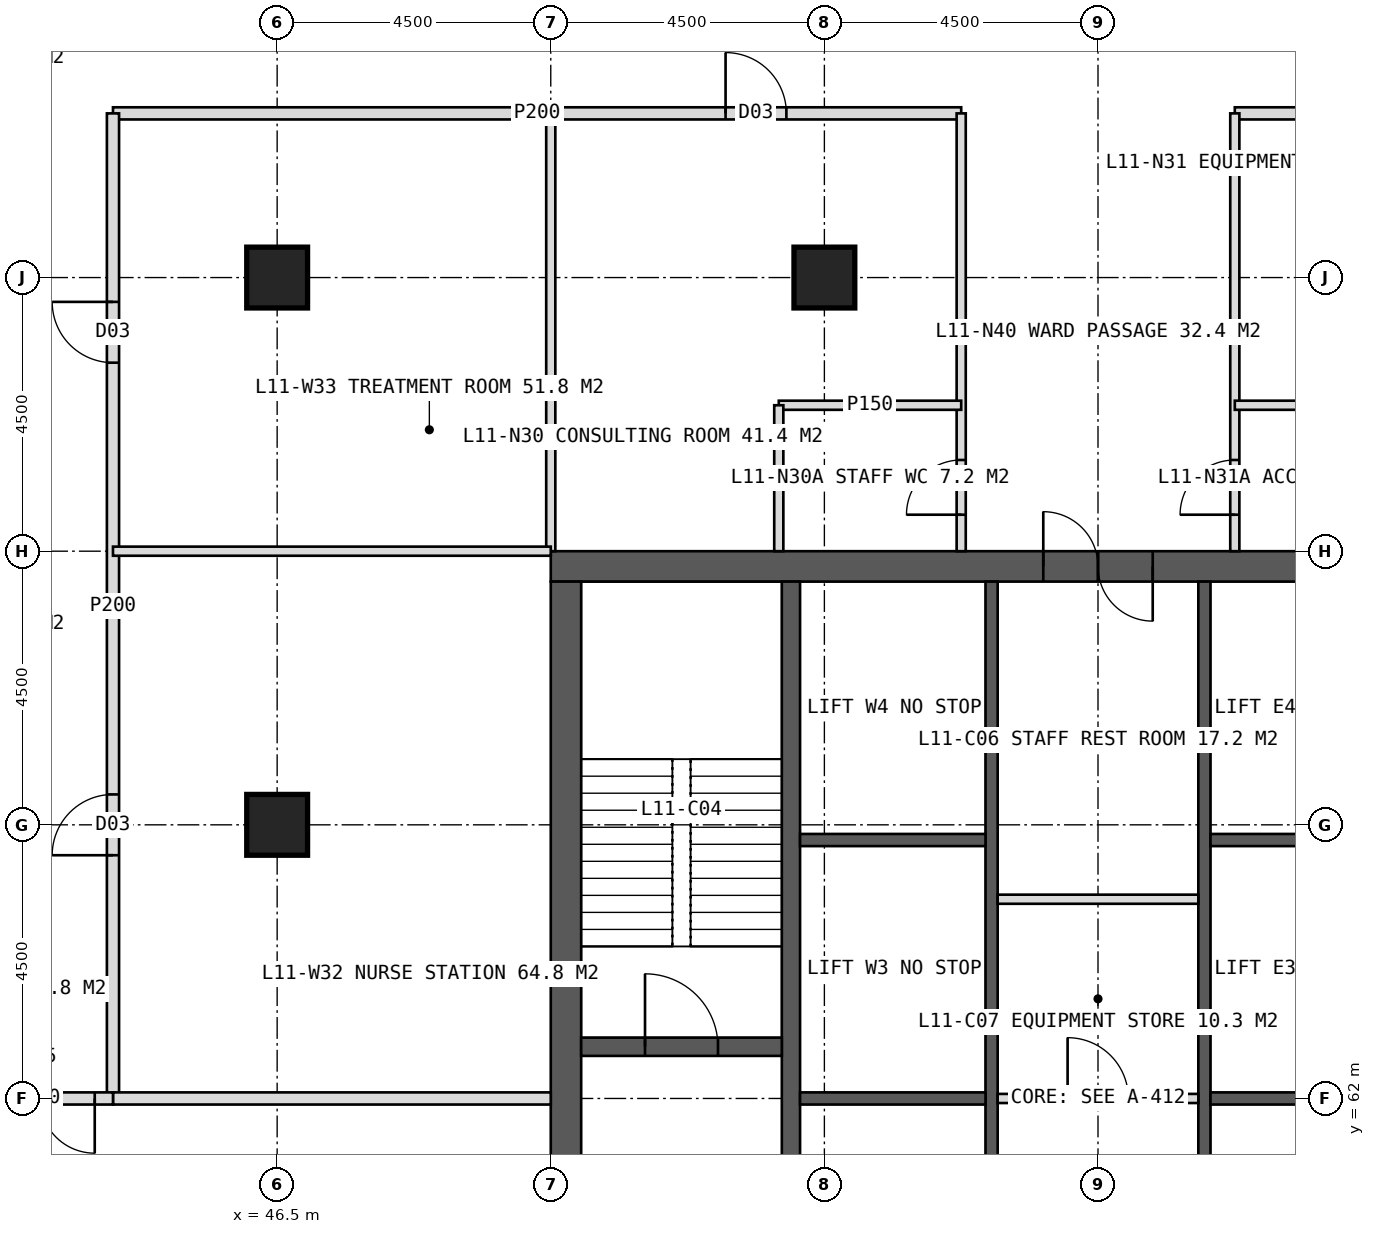
"""IFC4 building model, lengths in metres.
Left out: names, types, materials, properties, quantities, classifications, styles, units other than length and angle.
Written with IfcOpenShell. Run it as: python <this file> out.ifc"""

import sys

from ifc_helpers import new_model, si_unit, direction, frame, frame_2d, origin, origin_2d, place, context, subcontext, project, spatial, rectangle, hollow_rectangle, extrude, element, fill, save


model = new_model("IFC4")
c1 = context("Model", 3, precision=1e-05, world=origin(), true_north=direction((0.0, 1.0)))
c2 = subcontext(c1, "Body", "Model", "MODEL_VIEW")
j1 = project(units=[si_unit("LENGTHUNIT", "METRE"), si_unit("PLANEANGLEUNIT", "RADIAN")], contexts=[c1])
p1 = place(None, origin())
s1 = spatial("IfcSite", under=j1, at=p1, CompositionType="ELEMENT")
p2 = place(p1, origin())
s2 = spatial("IfcBuilding", under=s1, at=p2, CompositionType="ELEMENT")
p3 = place(p2, frame((0.0, 0.0, 51.0)))
s3 = spatial("IfcBuildingStorey", under=s2, at=p3, CompositionType="ELEMENT", Elevation=51.0)
p4 = place(p3, frame((51.0, 70.75, 0.0), z_axis=(0.0, 0.0, 1.0), x_axis=(1.0, 0.0, 0.0)))
e1 = element("IfcWall", 1, at=p4, inside=s3, PredefinedType="SHEAR", context=c2, shape_type="SweptSolid", body=[
    extrude(rectangle(XDim=18.0, YDim=0.5, at=frame_2d((9.0, 0.0))), origin(), (0.0, 0.0, 1.0), 4.0),
])
p5 = place(p4, frame((8.1, 0.0, 0.0)))
e2 = element("IfcOpeningElement", 2, at=p5, cuts=e1, PredefinedType="OPENING", context=c2, shape_type="SweptSolid", body=[
    extrude(rectangle(XDim=1.8, YDim=2.2, at=frame_2d((0.9, 1.1))), frame((0.0, 0.26, 0.0), z_axis=(0.0, -1.0, 0.0), x_axis=(1.0, 0.0, 0.0)), (0.0, 0.0, 1.0), 0.52),
])
p6 = place(p3, frame((51.25, 53.5, 0.0), z_axis=(0.0, 0.0, 1.0), x_axis=(0.0, 1.0, 0.0)))
e3 = element("IfcWall", 3, at=p6, inside=s3, PredefinedType="SHEAR", context=c2, shape_type="SweptSolid", body=[
    extrude(rectangle(XDim=17.0, YDim=0.5, at=frame_2d((8.5, 0.0))), origin(), (0.0, 0.0, 1.0), 4.0),
])
p7 = place(p6, frame((6.0, 0.0, 0.0)))
e4 = element("IfcOpeningElement", 4, at=p7, cuts=e3, PredefinedType="OPENING", context=c2, shape_type="SweptSolid", body=[
    extrude(rectangle(XDim=1.5, YDim=2.2, at=frame_2d((0.75, 1.1))), frame((0.0, 0.26, 0.0), z_axis=(0.0, -1.0, 0.0), x_axis=(1.0, 0.0, 0.0)), (0.0, 0.0, 1.0), 0.52),
])
p8 = place(p3, frame((54.95, 53.5, 0.0), z_axis=(0.0, 0.0, 1.0), x_axis=(0.0, 1.0, 0.0)))
e5 = element("IfcWall", 5, at=p8, inside=s3, PredefinedType="SHEAR", context=c2, shape_type="SweptSolid", body=[
    extrude(rectangle(XDim=17.0, YDim=0.3, at=frame_2d((8.5, 0.0))), origin(), (0.0, 0.0, 1.0), 4.0),
])
p9 = place(p3, frame((58.25, 53.5, 0.0), z_axis=(0.0, 0.0, 1.0), x_axis=(0.0, 1.0, 0.0)))
e6 = element("IfcWall", 6, at=p9, inside=s3, PredefinedType="SHEAR", context=c2, shape_type="SweptSolid", body=[
    extrude(rectangle(XDim=17.0, YDim=0.2, at=frame_2d((8.5, 0.0))), origin(), (0.0, 0.0, 1.0), 4.0),
])
p10 = place(p9, frame((1.375, 0.0, 0.0)))
e7 = element("IfcOpeningElement", 7, at=p10, cuts=e6, PredefinedType="OPENING", context=c2, shape_type="SweptSolid", body=[
    extrude(rectangle(XDim=1.4, YDim=2.2, at=frame_2d((0.7, 1.1))), frame((0.0, 0.11, 0.0), z_axis=(0.0, -1.0, 0.0), x_axis=(1.0, 0.0, 0.0)), (0.0, 0.0, 1.0), 0.22),
])
p11 = place(p9, frame((5.675, 0.0, 0.0)))
e8 = element("IfcOpeningElement", 8, at=p11, cuts=e6, PredefinedType="OPENING", context=c2, shape_type="SweptSolid", body=[
    extrude(rectangle(XDim=1.4, YDim=2.2, at=frame_2d((0.7, 1.1))), frame((0.0, 0.11, 0.0), z_axis=(0.0, -1.0, 0.0), x_axis=(1.0, 0.0, 0.0)), (0.0, 0.0, 1.0), 0.22),
])
p12 = place(p3, frame((61.75, 53.5, 0.0), z_axis=(0.0, 0.0, 1.0), x_axis=(0.0, 1.0, 0.0)))
e9 = element("IfcWall", 9, at=p12, inside=s3, PredefinedType="SHEAR", context=c2, shape_type="SweptSolid", body=[
    extrude(rectangle(XDim=17.0, YDim=0.2, at=frame_2d((8.5, 0.0))), origin(), (0.0, 0.0, 1.0), 4.0),
])
p13 = place(p12, frame((1.375, 0.0, 0.0)))
e10 = element("IfcOpeningElement", 10, at=p13, cuts=e9, PredefinedType="OPENING", context=c2, shape_type="SweptSolid", body=[
    extrude(rectangle(XDim=1.4, YDim=2.2, at=frame_2d((0.7, 1.1))), frame((0.0, 0.11, 0.0), z_axis=(0.0, -1.0, 0.0), x_axis=(1.0, 0.0, 0.0)), (0.0, 0.0, 1.0), 0.22),
])
p14 = place(p12, frame((5.675, 0.0, 0.0)))
e11 = element("IfcOpeningElement", 11, at=p14, cuts=e9, PredefinedType="OPENING", context=c2, shape_type="SweptSolid", body=[
    extrude(rectangle(XDim=1.4, YDim=2.2, at=frame_2d((0.7, 1.1))), frame((0.0, 0.11, 0.0), z_axis=(0.0, -1.0, 0.0), x_axis=(1.0, 0.0, 0.0)), (0.0, 0.0, 1.0), 0.22),
])
for number, where, z_axis, x_axis in (
    (12, (55.1, 62.0, 0.0), (0.0, 0.0, 1.0), (1.0, 0.0, 0.0)),
    (13, (61.85, 62.0, 0.0), (0.0, 0.0, 1.0), (1.0, 0.0, 0.0)),
    (14, (55.1, 66.25, 0.0), (0.0, 0.0, 1.0), (1.0, 0.0, 0.0)),
    (15, (61.85, 66.25, 0.0), (0.0, 0.0, 1.0), (1.0, 0.0, 0.0)),
):
    element("IfcWall", number, at=place(p3, frame(where, z_axis=z_axis, x_axis=x_axis)), inside=s3, PredefinedType="SHEAR", context=c2, shape_type="SweptSolid", body=[
        extrude(rectangle(XDim=3.05, YDim=0.2, at=frame_2d((1.525, 0.0))), origin(), (0.0, 0.0, 1.0), 4.0),
    ])
p15 = place(p3, frame((51.5, 62.85, 0.0), z_axis=(0.0, 0.0, 1.0), x_axis=(1.0, 0.0, 0.0)))
e16 = element("IfcWall", 16, at=p15, inside=s3, PredefinedType="SHEAR", context=c2, shape_type="SweptSolid", body=[
    extrude(rectangle(XDim=3.3, YDim=0.3, at=frame_2d((1.65, 0.0))), origin(), (0.0, 0.0, 1.0), 4.0),
])
p16 = place(p15, frame((1.05, 0.0, 0.0)))
e17 = element("IfcOpeningElement", 17, at=p16, cuts=e16, PredefinedType="OPENING", context=c2, shape_type="SweptSolid", body=[
    extrude(rectangle(XDim=1.2, YDim=2.1, at=frame_2d((0.6, 1.05))), frame((0.0, 0.16, 0.0), z_axis=(0.0, -1.0, 0.0), x_axis=(1.0, 0.0, 0.0)), (0.0, 0.0, 1.0), 0.32),
])
for number, where, z_axis, x_axis in (
    (18, (46.5, 75.5, 0.0), (0.0, 0.0, 1.0), (1.0, 0.0, 0.0)),
    (19, (55.5, 75.5, 0.0), (0.0, 0.0, 1.0), (1.0, 0.0, 0.0)),
    (20, (46.5, 66.5, 0.0), (0.0, 0.0, 1.0), (1.0, 0.0, 0.0)),
):
    element("IfcColumn", number, at=place(p3, frame(where, z_axis=z_axis, x_axis=x_axis)), inside=s3, PredefinedType="COLUMN", context=c2, shape_type="SweptSolid", body=[
        extrude(hollow_rectangle(XDim=1.0, YDim=1.0, WallThickness=0.1, at=origin_2d()), origin(), (0.0, 0.0, 1.0), 4.0),
    ])
p17 = place(p3, frame((51.0, 71.0, 0.0), z_axis=(0.0, 0.0, 1.0), x_axis=(0.0, 1.0, 0.0)))
e21 = element("IfcWall", 21, at=p17, inside=s3, PredefinedType="PARTITIONING", context=c2, shape_type="SweptSolid", body=[
    extrude(rectangle(XDim=7.2, YDim=0.15, at=frame_2d((3.6, 0.0))), origin(), (0.0, 0.0, 1.0), 3.75),
])
p18 = place(p3, frame((43.8, 78.2, 0.0), z_axis=(0.0, 0.0, 1.0), x_axis=(1.0, 0.0, 0.0)))
e22 = element("IfcWall", 22, at=p18, inside=s3, PredefinedType="PARTITIONING", context=c2, shape_type="SweptSolid", body=[
    extrude(rectangle(XDim=13.95, YDim=0.2, at=frame_2d((6.975, 0.0))), origin(), (0.0, 0.0, 1.0), 3.75),
])
p19 = place(p18, frame((10.075, 0.0, 0.0)))
e23 = element("IfcOpeningElement", 23, at=p19, cuts=e22, PredefinedType="OPENING", context=c2, shape_type="SweptSolid", body=[
    extrude(rectangle(XDim=1.0, YDim=2.1, at=frame_2d((0.5, 1.05))), frame((0.0, 0.11, 0.0), z_axis=(0.0, -1.0, 0.0), x_axis=(1.0, 0.0, 0.0)), (0.0, 0.0, 1.0), 0.22),
])
p20 = place(p3, frame((62.25, 78.2, 0.0), z_axis=(0.0, 0.0, 1.0), x_axis=(1.0, 0.0, 0.0)))
e24 = element("IfcWall", 24, at=p20, inside=s3, PredefinedType="PARTITIONING", context=c2, shape_type="SweptSolid", body=[
    extrude(rectangle(XDim=6.75, YDim=0.2, at=frame_2d((3.375, 0.0))), origin(), (0.0, 0.0, 1.0), 3.75),
])
p21 = place(p20, frame((1.375, 0.0, 0.0)))
e25 = element("IfcOpeningElement", 25, at=p21, cuts=e24, PredefinedType="OPENING", context=c2, shape_type="SweptSolid", body=[
    extrude(rectangle(XDim=1.0, YDim=2.1, at=frame_2d((0.5, 1.05))), frame((0.0, 0.11, 0.0), z_axis=(0.0, -1.0, 0.0), x_axis=(1.0, 0.0, 0.0)), (0.0, 0.0, 1.0), 0.22),
])
p22 = place(p20, frame((5.5, 0.0, 0.0)))
e26 = element("IfcOpeningElement", 26, at=p22, cuts=e24, PredefinedType="OPENING", context=c2, shape_type="SweptSolid", body=[
    extrude(rectangle(XDim=1.0, YDim=2.1, at=frame_2d((0.5, 1.05))), frame((0.0, 0.11, 0.0), z_axis=(0.0, -1.0, 0.0), x_axis=(1.0, 0.0, 0.0)), (0.0, 0.0, 1.0), 0.22),
])
p23 = place(p3, frame((57.75, 71.0, 0.0), z_axis=(0.0, 0.0, 1.0), x_axis=(0.0, 1.0, 0.0)))
e27 = element("IfcWall", 27, at=p23, inside=s3, PredefinedType="PARTITIONING", context=c2, shape_type="SweptSolid", body=[
    extrude(rectangle(XDim=7.2, YDim=0.15, at=frame_2d((3.6, 0.0))), origin(), (0.0, 0.0, 1.0), 3.75),
])
p24 = place(p23, frame((0.6, 0.0, 0.0)))
e28 = element("IfcOpeningElement", 28, at=p24, cuts=e27, PredefinedType="OPENING", context=c2, shape_type="SweptSolid", body=[
    extrude(rectangle(XDim=0.9, YDim=2.1, at=frame_2d((0.45, 1.05))), frame((0.0, 0.085, 0.0), z_axis=(0.0, -1.0, 0.0), x_axis=(1.0, 0.0, 0.0)), (0.0, 0.0, 1.0), 0.17),
])
p25 = place(p3, frame((62.25, 71.0, 0.0), z_axis=(0.0, 0.0, 1.0), x_axis=(0.0, 1.0, 0.0)))
e29 = element("IfcWall", 29, at=p25, inside=s3, PredefinedType="PARTITIONING", context=c2, shape_type="SweptSolid", body=[
    extrude(rectangle(XDim=7.2, YDim=0.15, at=frame_2d((3.6, 0.0))), origin(), (0.0, 0.0, 1.0), 3.75),
])
p26 = place(p25, frame((0.6, 0.0, 0.0)))
e30 = element("IfcOpeningElement", 30, at=p26, cuts=e29, PredefinedType="OPENING", context=c2, shape_type="SweptSolid", body=[
    extrude(rectangle(XDim=0.9, YDim=2.1, at=frame_2d((0.45, 1.05))), frame((0.0, 0.085, 0.0), z_axis=(0.0, -1.0, 0.0), x_axis=(1.0, 0.0, 0.0)), (0.0, 0.0, 1.0), 0.17),
])
p27 = place(p3, frame((54.75, 73.4, 0.0), z_axis=(0.0, 0.0, 1.0), x_axis=(1.0, 0.0, 0.0)))
e31 = element("IfcWall", 31, at=p27, inside=s3, PredefinedType="PARTITIONING", context=c2, shape_type="SweptSolid", body=[
    extrude(rectangle(XDim=3.0, YDim=0.15, at=frame_2d((1.5, 0.0))), origin(), (0.0, 0.0, 1.0), 3.75),
])
p28 = place(p3, frame((54.75, 71.0, 0.0), z_axis=(0.0, 0.0, 1.0), x_axis=(0.0, 1.0, 0.0)))
e32 = element("IfcWall", 32, at=p28, inside=s3, PredefinedType="PARTITIONING", context=c2, shape_type="SweptSolid", body=[
    extrude(rectangle(XDim=2.4, YDim=0.15, at=frame_2d((1.2, 0.0))), origin(), (0.0, 0.0, 1.0), 3.75),
])
p29 = place(p3, frame((62.25, 73.4, 0.0), z_axis=(0.0, 0.0, 1.0), x_axis=(1.0, 0.0, 0.0)))
e33 = element("IfcWall", 33, at=p29, inside=s3, PredefinedType="PARTITIONING", context=c2, shape_type="SweptSolid", body=[
    extrude(rectangle(XDim=3.0, YDim=0.15, at=frame_2d((1.5, 0.0))), origin(), (0.0, 0.0, 1.0), 3.75),
])
p30 = place(p3, frame((43.8, 62.0, 0.0), z_axis=(0.0, 0.0, 1.0), x_axis=(0.0, 1.0, 0.0)))
e34 = element("IfcWall", 34, at=p30, inside=s3, PredefinedType="PARTITIONING", context=c2, shape_type="SweptSolid", body=[
    extrude(rectangle(XDim=16.2, YDim=0.2, at=frame_2d((8.1, 0.0))), origin(), (0.0, 0.0, 1.0), 3.75),
])
p31 = place(p30, frame((4.0, 0.0, 0.0)))
e35 = element("IfcOpeningElement", 35, at=p31, cuts=e34, PredefinedType="OPENING", context=c2, shape_type="SweptSolid", body=[
    extrude(rectangle(XDim=1.0, YDim=2.1, at=frame_2d((0.5, 1.05))), frame((0.0, 0.11, 0.0), z_axis=(0.0, -1.0, 0.0), x_axis=(1.0, 0.0, 0.0)), (0.0, 0.0, 1.0), 0.22),
])
p32 = place(p30, frame((12.1, 0.0, 0.0)))
e36 = element("IfcOpeningElement", 36, at=p32, cuts=e34, PredefinedType="OPENING", context=c2, shape_type="SweptSolid", body=[
    extrude(rectangle(XDim=1.0, YDim=2.1, at=frame_2d((0.5, 1.05))), frame((0.0, 0.11, 0.0), z_axis=(0.0, -1.0, 0.0), x_axis=(1.0, 0.0, 0.0)), (0.0, 0.0, 1.0), 0.22),
])
p33 = place(p3, frame((51.0, 62.0, 0.0), z_axis=(0.0, 0.0, 1.0), x_axis=(-1.0, 0.0, 0.0)))
e37 = element("IfcWall", 37, at=p33, inside=s3, PredefinedType="SOLIDWALL", context=c2, shape_type="SweptSolid", body=[
    extrude(rectangle(XDim=7.2, YDim=0.2, at=frame_2d((3.6, 0.0))), origin(), (0.0, 0.0, 1.0), 2.75),
])
p34 = place(p3, frame((51.0, 71.0, 0.0), z_axis=(0.0, 0.0, 1.0), x_axis=(-1.0, 0.0, 0.0)))
e38 = element("IfcWall", 38, at=p34, inside=s3, PredefinedType="PARTITIONING", context=c2, shape_type="SweptSolid", body=[
    extrude(rectangle(XDim=7.2, YDim=0.15, at=frame_2d((3.6, 0.0))), origin(), (0.0, 0.0, 1.0), 3.75),
])
p35 = place(p3, frame((43.8, 62.0, 0.0), z_axis=(0.0, 0.0, 1.0), x_axis=(-1.0, 0.0, 0.0)))
e39 = element("IfcWall", 39, at=p35, inside=s3, PredefinedType="SOLIDWALL", context=c2, shape_type="SweptSolid", body=[
    extrude(rectangle(XDim=2.7, YDim=0.2, at=frame_2d((1.35, 0.0))), origin(), (0.0, 0.0, 1.0), 2.75),
])
p36 = place(p35, frame((0.3, 0.0, 0.0)))
e40 = element("IfcOpeningElement", 40, at=p36, cuts=e39, PredefinedType="OPENING", context=c2, shape_type="SweptSolid", body=[
    extrude(rectangle(XDim=1.8, YDim=2.2, at=frame_2d((0.9, 1.1))), frame((0.0, 0.11, 0.0), z_axis=(0.0, -1.0, 0.0), x_axis=(1.0, 0.0, 0.0)), (0.0, 0.0, 1.0), 0.22),
])
p37 = place(p3, frame((58.35, 62.0, 0.0), z_axis=(0.0, 0.0, 1.0), x_axis=(1.0, 0.0, 0.0)))
e41 = element("IfcWall", 41, at=p37, inside=s3, PredefinedType="PARTITIONING", context=c2, shape_type="SweptSolid", body=[
    extrude(rectangle(XDim=3.3, YDim=0.15, at=frame_2d((1.65, 0.0))), origin(), (0.0, 0.0, 1.0), 3.75),
])
p38 = place(p37, frame((1.15, 0.0, 0.0)))
e42 = element("IfcOpeningElement", 42, at=p38, cuts=e41, PredefinedType="OPENING", context=c2, shape_type="SweptSolid", body=[
    extrude(rectangle(XDim=1.0, YDim=2.1, at=frame_2d((0.5, 1.05))), frame((0.0, 0.085, 0.0), z_axis=(0.0, -1.0, 0.0), x_axis=(1.0, 0.0, 0.0)), (0.0, 0.0, 1.0), 0.17),
])
p39 = place(p3, frame((58.35, 65.277, 0.0), z_axis=(0.0, 0.0, 1.0), x_axis=(1.0, 0.0, 0.0)))
e43 = element("IfcWall", 43, at=p39, inside=s3, PredefinedType="PARTITIONING", context=c2, shape_type="SweptSolid", body=[
    extrude(rectangle(XDim=3.3, YDim=0.15, at=frame_2d((1.65, 0.0))), origin(), (0.0, 0.0, 1.0), 3.75),
])
p40 = place(p24, origin())
e44 = element("IfcDoor", 44, at=p40, inside=s3, OperationType="SINGLE_SWING_LEFT", PredefinedType="DOOR", context=c2, shape_type="SweptSolid", body=[
    extrude(rectangle(XDim=0.9, YDim=2.1, at=frame_2d((0.45, 1.05))), frame((0.0, 0.025, 0.0), z_axis=(0.0, -1.0, 0.0), x_axis=(1.0, 0.0, 0.0)), (0.0, 0.0, 1.0), 0.05),
])
fill(e28, e44)
p41 = place(p19, origin())
e45 = element("IfcDoor", 45, at=p41, inside=s3, OperationType="SINGLE_SWING_LEFT", PredefinedType="DOOR", context=c2, shape_type="SweptSolid", body=[
    extrude(rectangle(XDim=1.0, YDim=2.1, at=frame_2d((0.5, 1.05))), frame((0.0, 0.025, 0.0), z_axis=(0.0, -1.0, 0.0), x_axis=(1.0, 0.0, 0.0)), (0.0, 0.0, 1.0), 0.05),
])
fill(e23, e45)
p42 = place(p26, origin())
e46 = element("IfcDoor", 46, at=p42, inside=s3, OperationType="SINGLE_SWING_LEFT", PredefinedType="DOOR", context=c2, shape_type="SweptSolid", body=[
    extrude(rectangle(XDim=0.9, YDim=2.1, at=frame_2d((0.45, 1.05))), frame((0.0, 0.025, 0.0), z_axis=(0.0, -1.0, 0.0), x_axis=(1.0, 0.0, 0.0)), (0.0, 0.0, 1.0), 0.05),
])
fill(e30, e46)
p43 = place(p31, origin())
e47 = element("IfcDoor", 47, at=p43, inside=s3, OperationType="SINGLE_SWING_LEFT", PredefinedType="DOOR", context=c2, shape_type="SweptSolid", body=[
    extrude(rectangle(XDim=1.0, YDim=2.1, at=frame_2d((0.5, 1.05))), frame((0.0, 0.025, 0.0), z_axis=(0.0, -1.0, 0.0), x_axis=(1.0, 0.0, 0.0)), (0.0, 0.0, 1.0), 0.05),
])
fill(e35, e47)
p44 = place(p32, origin())
e48 = element("IfcDoor", 48, at=p44, inside=s3, OperationType="SINGLE_SWING_RIGHT", PredefinedType="DOOR", context=c2, shape_type="SweptSolid", body=[
    extrude(rectangle(XDim=1.0, YDim=2.1, at=frame_2d((0.5, 1.05))), frame((0.0, 0.025, 0.0), z_axis=(0.0, -1.0, 0.0), x_axis=(1.0, 0.0, 0.0)), (0.0, 0.0, 1.0), 0.05),
])
fill(e36, e48)
p45 = place(p36, origin())
e49 = element("IfcDoor", 49, at=p45, inside=s3, OperationType="DOUBLE_DOOR_DOUBLE_SWING", PredefinedType="DOOR", context=c2, shape_type="SweptSolid", body=[
    extrude(rectangle(XDim=1.8, YDim=2.2, at=frame_2d((0.9, 1.1))), frame((0.0, 0.025, 0.0), z_axis=(0.0, -1.0, 0.0), x_axis=(1.0, 0.0, 0.0)), (0.0, 0.0, 1.0), 0.05),
])
fill(e40, e49)
p46 = place(p16, origin())
e50 = element("IfcDoor", 50, at=p46, inside=s3, OperationType="SINGLE_SWING_LEFT", PredefinedType="DOOR", context=c2, shape_type="SweptSolid", body=[
    extrude(rectangle(XDim=1.2, YDim=2.1, at=frame_2d((0.6, 1.05))), frame((0.0, 0.025, 0.0), z_axis=(0.0, -1.0, 0.0), x_axis=(1.0, 0.0, 0.0)), (0.0, 0.0, 1.0), 0.05),
])
fill(e17, e50)
p47 = place(p38, origin())
e51 = element("IfcDoor", 51, at=p47, inside=s3, OperationType="SINGLE_SWING_LEFT", PredefinedType="DOOR", context=c2, shape_type="SweptSolid", body=[
    extrude(rectangle(XDim=1.0, YDim=2.1, at=frame_2d((0.5, 1.05))), frame((0.0, 0.025, 0.0), z_axis=(0.0, -1.0, 0.0), x_axis=(1.0, 0.0, 0.0)), (0.0, 0.0, 1.0), 0.05),
])
fill(e42, e51)
p48 = place(p5, origin())
e52 = element("IfcDoor", 52, at=p48, inside=s3, OperationType="DOUBLE_DOOR_SINGLE_SWING", PredefinedType="DOOR", context=c2, shape_type="SweptSolid", body=[
    extrude(rectangle(XDim=1.8, YDim=2.2, at=frame_2d((0.9, 1.1))), frame((0.0, 0.025, 0.0), z_axis=(0.0, -1.0, 0.0), x_axis=(1.0, 0.0, 0.0)), (0.0, 0.0, 1.0), 0.05),
])
fill(e2, e52)
save(model, sys.argv[1])
